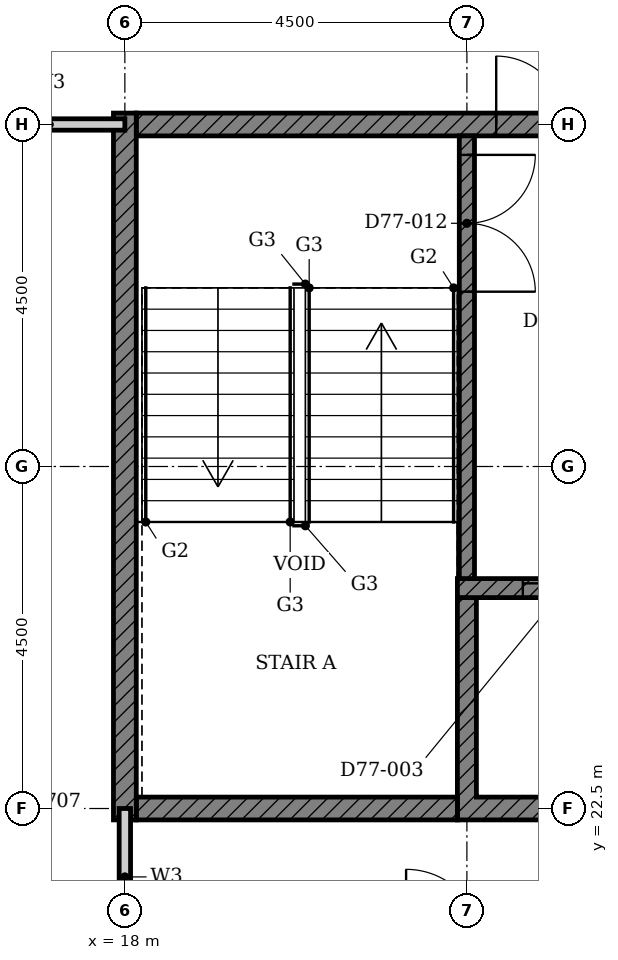
"""IFC4 building model, lengths in metres.
Left out: names, types, materials, properties, quantities, classifications, styles, units other than length and angle.
Written with IfcOpenShell. Run it as: python <this file> out.ifc"""

import sys

from ifc_helpers import new_model, si_unit, direction, frame, frame_2d, origin, place, context, subcontext, project, spatial, polyline, rectangle, outline, extrude, element, fill, save


model = new_model("IFC4")
c1 = context("Model", 3, precision=1e-05, world=origin(), true_north=direction((0.0, 1.0)))
c2 = subcontext(c1, "Body", "Model", "MODEL_VIEW")
j1 = project(units=[si_unit("LENGTHUNIT", "METRE"), si_unit("PLANEANGLEUNIT", "RADIAN")], contexts=[c1])
p1 = place(None, origin())
s1 = spatial("IfcSite", under=j1, at=p1, CompositionType="ELEMENT")
p2 = place(p1, origin())
s2 = spatial("IfcBuilding", under=s1, at=p2, CompositionType="ELEMENT")
p3 = place(p2, frame((0.0, 0.0, 301.9)))
s3 = spatial("IfcBuildingStorey", under=s2, at=p3, CompositionType="ELEMENT", Elevation=301.9)
p4 = place(p3, origin())
e1 = element("IfcWall", 1, at=p4, inside=s3, PredefinedType="SHEAR", context=c2, shape_type="SweptSolid", body=[
    extrude(outline(polyline([(22.375, 22.35), (25.197, 22.35), (25.197, 25.275), (24.947, 25.275), (24.947, 22.65), (22.625, 22.65), (22.625, 25.275), (22.375, 25.275), (22.375, 22.35)])), origin(), (0.0, 0.0, 1.0), 3.2),
])
p5 = place(p3, frame((18.15, 22.5, 0.0), z_axis=(0.0, 0.0, 1.0), x_axis=(1.0, 0.0, 0.0)))
e2 = element("IfcWall", 2, at=p5, inside=s3, PredefinedType="SHEAR", context=c2, shape_type="SweptSolid", body=[
    extrude(rectangle(XDim=4.225, YDim=0.3, at=frame_2d((2.113, 0.0))), origin(), (0.0, 0.0, 1.0), 3.2),
])
p6 = place(p3, frame((18.15, 31.5, 0.0), z_axis=(0.0, 0.0, 1.0), x_axis=(1.0, 0.0, 0.0)))
e3 = element("IfcWall", 3, at=p6, inside=s3, PredefinedType="SHEAR", context=c2, shape_type="SweptSolid", body=[
    extrude(rectangle(XDim=9.368, YDim=0.3, at=frame_2d((4.684, 0.0))), origin(), (0.0, 0.0, 1.0), 3.2),
])
p7 = place(p6, frame((4.736, 0.0, 0.0)))
e4 = element("IfcOpeningElement", 4, at=p7, cuts=e3, PredefinedType="OPENING", context=c2, shape_type="SweptSolid", body=[
    extrude(rectangle(XDim=1.8, YDim=2.1, at=frame_2d((0.9, 1.05))), frame((0.0, 0.16, 0.0), z_axis=(0.0, -1.0, 0.0), x_axis=(1.0, 0.0, 0.0)), (0.0, 0.0, 1.0), 0.32),
])
p8 = place(p3, frame((18.0, 22.35, 0.0), z_axis=(0.0, 0.0, 1.0), x_axis=(0.0, 1.0, 0.0)))
e5 = element("IfcWall", 5, at=p8, inside=s3, PredefinedType="SHEAR", context=c2, shape_type="SweptSolid", body=[
    extrude(rectangle(XDim=9.3, YDim=0.3, at=frame_2d((4.65, 0.0))), origin(), (0.0, 0.0, 1.0), 3.2),
])
p9 = place(p3, frame((22.375, 25.4, 0.0), z_axis=(0.0, 0.0, 1.0), x_axis=(1.0, 0.0, 0.0)))
e6 = element("IfcWall", 6, at=p9, inside=s3, PredefinedType="SHEAR", context=c2, shape_type="SweptSolid", body=[
    extrude(rectangle(XDim=15.678, YDim=0.25, at=frame_2d((7.839, 0.0))), origin(), (0.0, 0.0, 1.0), 3.2),
])
p10 = place(p9, frame((6.004, 0.0, 0.0)))
e7 = element("IfcOpeningElement", 7, at=p10, cuts=e6, PredefinedType="OPENING", context=c2, shape_type="SweptSolid", body=[
    extrude(rectangle(XDim=1.1, YDim=2.1, at=frame_2d((0.55, 1.05))), frame((0.0, 0.135, 0.0), z_axis=(0.0, -1.0, 0.0), x_axis=(1.0, 0.0, 0.0)), (0.0, 0.0, 1.0), 0.27),
])
p11 = place(p9, frame((0.861, 0.0, 0.0)))
e8 = element("IfcOpeningElement", 8, at=p11, cuts=e6, PredefinedType="OPENING", context=c2, shape_type="SweptSolid", body=[
    extrude(rectangle(XDim=1.1, YDim=2.1, at=frame_2d((0.55, 1.05))), frame((0.0, 0.135, 0.0), z_axis=(0.0, -1.0, 0.0), x_axis=(1.0, 0.0, 0.0)), (0.0, 0.0, 1.0), 0.27),
])
p12 = place(p9, frame((3.532, 0.0, 0.0)))
e9 = element("IfcOpeningElement", 9, at=p12, cuts=e6, PredefinedType="OPENING", context=c2, shape_type="SweptSolid", body=[
    extrude(rectangle(XDim=0.9, YDim=2.1, at=frame_2d((0.45, 1.05))), frame((0.0, 0.135, 0.0), z_axis=(0.0, -1.0, 0.0), x_axis=(1.0, 0.0, 0.0)), (0.0, 0.0, 1.0), 0.27),
])
p13 = place(p9, frame((9.961, 0.0, 0.0)))
e10 = element("IfcOpeningElement", 10, at=p13, cuts=e6, PredefinedType="OPENING", context=c2, shape_type="SweptSolid", body=[
    extrude(rectangle(XDim=0.9, YDim=2.1, at=frame_2d((0.45, 1.05))), frame((0.0, 0.135, 0.0), z_axis=(0.0, -1.0, 0.0), x_axis=(1.0, 0.0, 0.0)), (0.0, 0.0, 1.0), 0.27),
])
p14 = place(p9, frame((13.818, 0.0, 0.0)))
e11 = element("IfcOpeningElement", 11, at=p14, cuts=e6, PredefinedType="OPENING", context=c2, shape_type="SweptSolid", body=[
    extrude(rectangle(XDim=0.9, YDim=2.1, at=frame_2d((0.45, 1.05))), frame((0.0, 0.135, 0.0), z_axis=(0.0, -1.0, 0.0), x_axis=(1.0, 0.0, 0.0)), (0.0, 0.0, 1.0), 0.27),
])
p15 = place(p3, frame((22.5, 31.35, 0.0), z_axis=(0.0, 0.0, 1.0), x_axis=(0.0, -1.0, 0.0)))
e12 = element("IfcWall", 12, at=p15, inside=s3, PredefinedType="SHEAR", context=c2, shape_type="SweptSolid", body=[
    extrude(rectangle(XDim=5.825, YDim=0.2, at=frame_2d((2.913, 0.0))), origin(), (0.0, 0.0, 1.0), 3.2),
])
p16 = place(p15, frame((0.25, 0.0, 0.0)))
e13 = element("IfcOpeningElement", 13, at=p16, cuts=e12, PredefinedType="OPENING", context=c2, shape_type="SweptSolid", body=[
    extrude(rectangle(XDim=1.8, YDim=2.1, at=frame_2d((0.9, 1.05))), frame((0.0, 0.11, 0.0), z_axis=(0.0, -1.0, 0.0), x_axis=(1.0, 0.0, 0.0)), (0.0, 0.0, 1.0), 0.22),
])
p17 = place(p3, frame((13.26, 31.5, 0.0), z_axis=(0.0, 0.0, 1.0), x_axis=(1.0, 0.0, 0.0)))
e14 = element("IfcWall", 14, at=p17, inside=s3, PredefinedType="PARTITIONING", context=c2, shape_type="SweptSolid", body=[
    extrude(rectangle(XDim=4.74, YDim=0.15, at=frame_2d((2.37, 0.0))), origin(), (0.0, 0.0, 1.0), 3.2),
])
p18 = place(p17, frame((1.75, 0.0, 0.0)))
e15 = element("IfcOpeningElement", 15, at=p18, cuts=e14, PredefinedType="OPENING", context=c2, shape_type="SweptSolid", body=[
    extrude(rectangle(XDim=1.0, YDim=2.2, at=frame_2d((0.5, 1.1))), frame((0.0, 0.085, 0.0), z_axis=(0.0, -1.0, 0.0), x_axis=(1.0, 0.0, 0.0)), (0.0, 0.0, 1.0), 0.17),
])
p19 = place(p3, frame((18.0, 20.7, 0.0), z_axis=(0.0, 0.0, 1.0), x_axis=(0.0, 1.0, 0.0)))
e16 = element("IfcWall", 16, at=p19, inside=s3, PredefinedType="PARTITIONING", context=c2, shape_type="SweptSolid", body=[
    extrude(rectangle(XDim=1.8, YDim=0.15, at=frame_2d((0.9, 0.0))), origin(), (0.0, 0.0, 1.0), 3.2),
])
p20 = place(p11, origin())
e17 = element("IfcDoor", 17, at=p20, inside=s3, OperationType="DOUBLE_DOOR_SLIDING", PredefinedType="DOOR", context=c2, shape_type="SweptSolid", body=[
    extrude(rectangle(XDim=1.1, YDim=2.1, at=frame_2d((0.55, 1.05))), frame((0.0, 0.025, 0.0), z_axis=(0.0, -1.0, 0.0), x_axis=(1.0, 0.0, 0.0)), (0.0, 0.0, 1.0), 0.05),
])
fill(e8, e17)
p21 = place(p16, origin())
e18 = element("IfcDoor", 18, at=p21, inside=s3, OperationType="DOUBLE_DOOR_SINGLE_SWING", PredefinedType="DOOR", context=c2, shape_type="SweptSolid", body=[
    extrude(rectangle(XDim=1.8, YDim=2.1, at=frame_2d((0.9, 1.05))), frame((0.0, 0.025, 0.0), z_axis=(0.0, -1.0, 0.0), x_axis=(1.0, 0.0, 0.0)), (0.0, 0.0, 1.0), 0.05),
])
fill(e13, e18)
p22 = place(p7, origin())
e19 = element("IfcDoor", 19, at=p22, inside=s3, OperationType="DOUBLE_DOOR_SINGLE_SWING", PredefinedType="DOOR", context=c2, shape_type="SweptSolid", body=[
    extrude(rectangle(XDim=1.8, YDim=2.1, at=frame_2d((0.9, 1.05))), frame((0.0, 0.025, 0.0), z_axis=(0.0, -1.0, 0.0), x_axis=(1.0, 0.0, 0.0)), (0.0, 0.0, 1.0), 0.05),
])
fill(e4, e19)
save(model, sys.argv[1])
